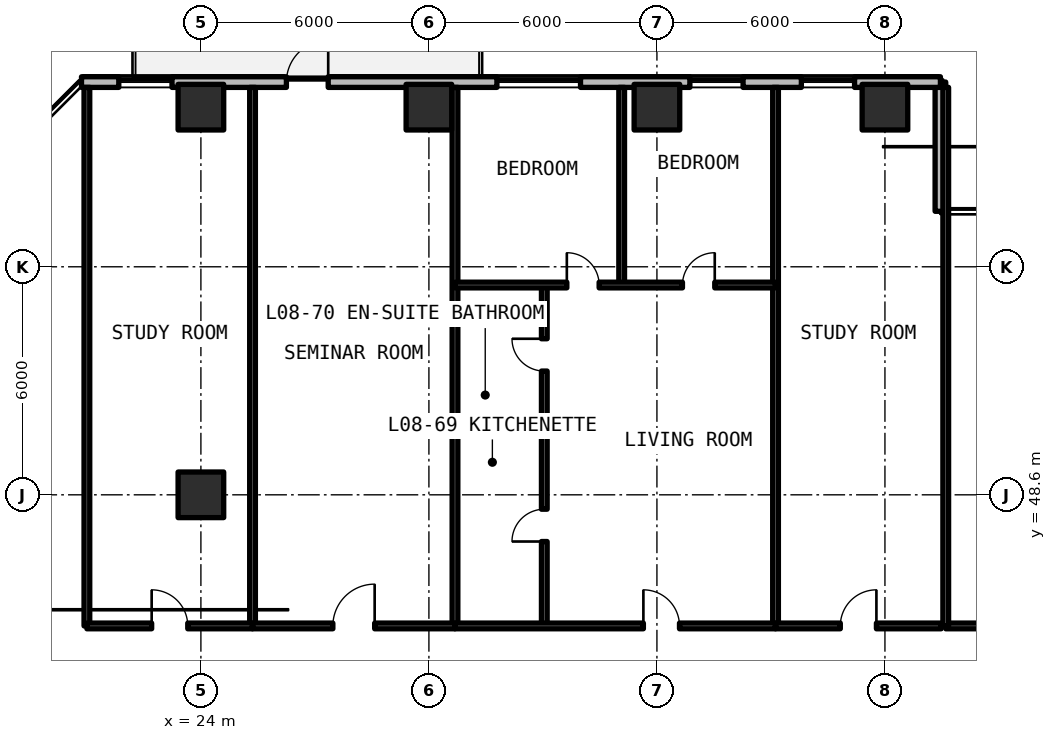
"""IFC4 building model, lengths in metres.
Left out: names, types, materials, properties, quantities, classifications, styles, units other than length and angle.
Written with IfcOpenShell. Run it as: python <this file> out.ifc"""

import sys

from ifc_helpers import new_model, si_unit, direction, frame, frame_2d, origin, origin_2d, place, context, subcontext, project, spatial, rectangle, extrude, element, fill, save


model = new_model("IFC4")
c1 = context("Model", 3, precision=1e-05, world=origin(), true_north=direction((0.0, 1.0)))
c2 = subcontext(c1, "Body", "Model", "MODEL_VIEW")
j1 = project(units=[si_unit("LENGTHUNIT", "METRE"), si_unit("PLANEANGLEUNIT", "RADIAN")], contexts=[c1])
p1 = place(None, origin())
s1 = spatial("IfcSite", under=j1, at=p1, CompositionType="ELEMENT")
p2 = place(p1, origin())
s2 = spatial("IfcBuilding", under=s1, at=p2, CompositionType="ELEMENT")
p3 = place(p2, frame((0.0, 0.0, 32.34)))
s3 = spatial("IfcBuildingStorey", under=s2, at=p3, CompositionType="ELEMENT", Elevation=32.34)
for number, where, z_axis, x_axis in (
    (1, (24.0, 48.6, 0.0), (0.0, 0.0, 1.0), (1.0, 0.0, 0.0)),
    (2, (24.0, 58.8, 0.0), (0.0, 0.0, 1.0), (1.0, 0.0, 0.0)),
    (3, (30.0, 58.8, 0.0), (0.0, 0.0, 1.0), (1.0, 0.0, 0.0)),
    (4, (36.0, 58.8, 0.0), (0.0, 0.0, 1.0), (1.0, 0.0, 0.0)),
    (5, (42.0, 58.8, 0.0), (0.0, 0.0, 1.0), (1.0, 0.0, 0.0)),
):
    element("IfcColumn", number, at=place(p3, frame(where, z_axis=z_axis, x_axis=x_axis)), inside=s3, PredefinedType="COLUMN", context=c2, shape_type="SweptSolid", body=[
        extrude(rectangle(XDim=1.2, YDim=1.2, at=origin_2d()), origin(), (0.0, 0.0, 1.0), 3.3),
    ])
p4 = place(p3, frame((43.46, 56.06, 0.0), z_axis=(0.0, 0.0, 1.0), x_axis=(0.0, 1.0, 0.0)))
e6 = element("IfcWall", 6, at=p4, inside=s3, PredefinedType="SOLIDWALL", context=c2, shape_type="SweptSolid", body=[
    extrude(rectangle(XDim=3.4, YDim=0.28, at=frame_2d((1.7, 0.0))), origin(), (0.0, 0.0, 1.0), 3.08),
])
p5 = place(p3, frame((43.46, 59.46, 0.0), z_axis=(0.0, 0.0, 1.0), x_axis=(-1.0, 0.0, 0.0)))
e7 = element("IfcWall", 7, at=p5, inside=s3, PredefinedType="SOLIDWALL", context=c2, shape_type="SweptSolid", body=[
    extrude(rectangle(XDim=22.602, YDim=0.28, at=frame_2d((11.301, 0.0))), origin(), (0.0, 0.0, 1.0), 3.08),
])
p6 = place(p5, frame((16.11, 0.0, 0.0)))
e8 = element("IfcOpeningElement", 8, at=p6, cuts=e7, PredefinedType="OPENING", context=c2, shape_type="SweptSolid", body=[
    extrude(rectangle(XDim=1.1, YDim=2.15, at=frame_2d((0.55, 1.075))), frame((0.0, 0.15, 0.0), z_axis=(0.0, -1.0, 0.0), x_axis=(1.0, 0.0, 0.0)), (0.0, 0.0, 1.0), 0.3),
])
p7 = place(p5, frame((20.221, 0.0, 0.78)))
e9 = element("IfcOpeningElement", 9, at=p7, cuts=e7, PredefinedType="OPENING", context=c2, shape_type="SweptSolid", body=[
    extrude(rectangle(XDim=1.4, YDim=1.65, at=frame_2d((0.7, 0.825))), frame((0.0, 0.15, 0.0), z_axis=(0.0, -1.0, 0.0), x_axis=(1.0, 0.0, 0.0)), (0.0, 0.0, 1.0), 0.3),
])
p8 = place(p5, frame((9.471, 0.0, 0.78)))
e10 = element("IfcOpeningElement", 10, at=p8, cuts=e7, PredefinedType="OPENING", context=c2, shape_type="SweptSolid", body=[
    extrude(rectangle(XDim=2.2, YDim=1.66, at=frame_2d((1.1, 0.83))), frame((0.0, 0.15, 0.0), z_axis=(0.0, -1.0, 0.0), x_axis=(1.0, 0.0, 0.0)), (0.0, 0.0, 1.0), 0.3),
])
p9 = place(p5, frame((5.193, 0.0, 0.78)))
e11 = element("IfcOpeningElement", 11, at=p9, cuts=e7, PredefinedType="OPENING", context=c2, shape_type="SweptSolid", body=[
    extrude(rectangle(XDim=1.4, YDim=1.65, at=frame_2d((0.7, 0.825))), frame((0.0, 0.15, 0.0), z_axis=(0.0, -1.0, 0.0), x_axis=(1.0, 0.0, 0.0)), (0.0, 0.0, 1.0), 0.3),
])
p10 = place(p5, frame((2.26, 0.0, 0.78)))
e12 = element("IfcOpeningElement", 12, at=p10, cuts=e7, PredefinedType="OPENING", context=c2, shape_type="SweptSolid", body=[
    extrude(rectangle(XDim=1.4, YDim=1.65, at=frame_2d((0.7, 0.825))), frame((0.0, 0.15, 0.0), z_axis=(0.0, -1.0, 0.0), x_axis=(1.0, 0.0, 0.0)), (0.0, 0.0, 1.0), 0.3),
])
p11 = place(p3, frame((43.6, 45.15, 0.0), z_axis=(0.0, 0.0, 1.0), x_axis=(1.0, 0.0, 0.0)))
e13 = element("IfcWall", 13, at=p11, inside=s3, PredefinedType="SOLIDWALL", context=c2, shape_type="SweptSolid", body=[
    extrude(rectangle(XDim=8.4, YDim=0.15, at=frame_2d((4.2, 0.0))), origin(), (0.0, 0.0, 1.0), 2.35),
])
p12 = place(p11, frame((3.65, 0.0, 0.0)))
e14 = element("IfcOpeningElement", 14, at=p12, cuts=e13, PredefinedType="OPENING", context=c2, shape_type="SweptSolid", body=[
    extrude(rectangle(XDim=1.1, YDim=2.15, at=frame_2d((0.55, 1.075))), frame((0.0, 0.085, 0.0), z_axis=(0.0, -1.0, 0.0), x_axis=(1.0, 0.0, 0.0)), (0.0, 0.0, 1.0), 0.17),
])
for number, where, z_axis, x_axis in (
    (15, (43.6, 45.15, 0.0), (0.0, 0.0, 1.0), (0.0, 1.0, 0.0)),
    (16, (21.0, 45.15, 0.0), (0.0, 0.0, 1.0), (0.0, 1.0, 0.0)),
    (17, (25.359, 45.15, 0.0), (0.0, 0.0, 1.0), (0.0, 1.0, 0.0)),
):
    element("IfcWall", number, at=place(p3, frame(where, z_axis=z_axis, x_axis=x_axis)), inside=s3, PredefinedType="SOLIDWALL", context=c2, shape_type="SweptSolid", body=[
        extrude(rectangle(XDim=14.17, YDim=0.15, at=frame_2d((7.085, 0.0))), origin(), (0.0, 0.0, 1.0), 2.35),
    ])
p13 = place(p3, frame((21.0, 45.15, 0.0), z_axis=(0.0, 0.0, 1.0), x_axis=(1.0, 0.0, 0.0)))
e18 = element("IfcWall", 18, at=p13, inside=s3, PredefinedType="SOLIDWALL", context=c2, shape_type="SweptSolid", body=[
    extrude(rectangle(XDim=4.359, YDim=0.15, at=frame_2d((2.179, 0.0))), origin(), (0.0, 0.0, 1.0), 2.35),
])
p14 = place(p13, frame((1.704, 0.0, 0.0)))
e19 = element("IfcOpeningElement", 19, at=p14, cuts=e18, PredefinedType="OPENING", context=c2, shape_type="SweptSolid", body=[
    extrude(rectangle(XDim=0.95, YDim=2.15, at=frame_2d((0.475, 1.075))), frame((0.0, 0.085, 0.0), z_axis=(0.0, -1.0, 0.0), x_axis=(1.0, 0.0, 0.0)), (0.0, 0.0, 1.0), 0.17),
])
p15 = place(p3, frame((30.686, 45.15, 0.0), z_axis=(0.0, 0.0, 1.0), x_axis=(0.0, 1.0, 0.0)))
e20 = element("IfcWall", 20, at=p15, inside=s3, PredefinedType="SOLIDWALL", context=c2, shape_type="SweptSolid", body=[
    extrude(rectangle(XDim=14.17, YDim=0.15, at=frame_2d((7.085, 0.0))), origin(), (0.0, 0.0, 1.0), 2.35),
])
p16 = place(p3, frame((25.359, 45.15, 0.0), z_axis=(0.0, 0.0, 1.0), x_axis=(1.0, 0.0, 0.0)))
e21 = element("IfcWall", 21, at=p16, inside=s3, PredefinedType="SOLIDWALL", context=c2, shape_type="SweptSolid", body=[
    extrude(rectangle(XDim=5.327, YDim=0.15, at=frame_2d((2.664, 0.0))), origin(), (0.0, 0.0, 1.0), 2.35),
])
p17 = place(p16, frame((2.114, 0.0, 0.0)))
e22 = element("IfcOpeningElement", 22, at=p17, cuts=e21, PredefinedType="OPENING", context=c2, shape_type="SweptSolid", body=[
    extrude(rectangle(XDim=1.1, YDim=2.15, at=frame_2d((0.55, 1.075))), frame((0.0, 0.085, 0.0), z_axis=(0.0, -1.0, 0.0), x_axis=(1.0, 0.0, 0.0)), (0.0, 0.0, 1.0), 0.17),
])
p18 = place(p3, frame((39.121, 45.15, 0.0), z_axis=(0.0, 0.0, 1.0), x_axis=(0.0, 1.0, 0.0)))
e23 = element("IfcWall", 23, at=p18, inside=s3, PredefinedType="SOLIDWALL", context=c2, shape_type="SweptSolid", body=[
    extrude(rectangle(XDim=14.17, YDim=0.15, at=frame_2d((7.085, 0.0))), origin(), (0.0, 0.0, 1.0), 2.35),
])
p19 = place(p3, frame((30.686, 50.442, 0.0), z_axis=(0.0, 0.0, 1.0), x_axis=(1.0, 0.0, 0.0)))
e24 = element("IfcWall", 24, at=p19, inside=s3, PredefinedType="PARTITIONING", context=c2, shape_type="SweptSolid", body=[
    extrude(rectangle(XDim=2.35, YDim=0.15, at=frame_2d((1.175, 0.0))), origin(), (0.0, 0.0, 1.0), 2.35),
])
p20 = place(p3, frame((33.036, 45.15, 0.0), z_axis=(0.0, 0.0, 1.0), x_axis=(0.0, 1.0, 0.0)))
e25 = element("IfcWall", 25, at=p20, inside=s3, PredefinedType="PARTITIONING", context=c2, shape_type="SweptSolid", body=[
    extrude(rectangle(XDim=8.97, YDim=0.15, at=frame_2d((4.485, 0.0))), origin(), (0.0, 0.0, 1.0), 2.35),
])
p21 = place(p20, frame((2.221, 0.0, 0.0)))
e26 = element("IfcOpeningElement", 26, at=p21, cuts=e25, PredefinedType="OPENING", context=c2, shape_type="SweptSolid", body=[
    extrude(rectangle(XDim=0.85, YDim=2.1, at=frame_2d((0.425, 1.05))), frame((0.0, 0.085, 0.0), z_axis=(0.0, -1.0, 0.0), x_axis=(1.0, 0.0, 0.0)), (0.0, 0.0, 1.0), 0.17),
])
p22 = place(p20, frame((6.706, 0.0, 0.0)))
e27 = element("IfcOpeningElement", 27, at=p22, cuts=e25, PredefinedType="OPENING", context=c2, shape_type="SweptSolid", body=[
    extrude(rectangle(XDim=0.85, YDim=2.1, at=frame_2d((0.425, 1.05))), frame((0.0, 0.085, 0.0), z_axis=(0.0, -1.0, 0.0), x_axis=(1.0, 0.0, 0.0)), (0.0, 0.0, 1.0), 0.17),
])
p23 = place(p3, frame((35.073, 54.12, 0.0), z_axis=(0.0, 0.0, 1.0), x_axis=(0.0, 1.0, 0.0)))
e28 = element("IfcWall", 28, at=p23, inside=s3, PredefinedType="PARTITIONING", context=c2, shape_type="SweptSolid", body=[
    extrude(rectangle(XDim=5.2, YDim=0.15, at=frame_2d((2.6, 0.0))), origin(), (0.0, 0.0, 1.0), 2.35),
])
p24 = place(p3, frame((30.686, 54.12, 0.0), z_axis=(0.0, 0.0, 1.0), x_axis=(1.0, 0.0, 0.0)))
e29 = element("IfcWall", 29, at=p24, inside=s3, PredefinedType="PARTITIONING", context=c2, shape_type="SweptSolid", body=[
    extrude(rectangle(XDim=8.435, YDim=0.15, at=frame_2d((4.217, 0.0))), origin(), (0.0, 0.0, 1.0), 2.35),
])
p25 = place(p24, frame((2.943, 0.0, 0.0)))
e30 = element("IfcOpeningElement", 30, at=p25, cuts=e29, PredefinedType="OPENING", context=c2, shape_type="SweptSolid", body=[
    extrude(rectangle(XDim=0.85, YDim=2.1, at=frame_2d((0.425, 1.05))), frame((0.0, 0.085, 0.0), z_axis=(0.0, -1.0, 0.0), x_axis=(1.0, 0.0, 0.0)), (0.0, 0.0, 1.0), 0.17),
])
p26 = place(p24, frame((5.986, 0.0, 0.0)))
e31 = element("IfcOpeningElement", 31, at=p26, cuts=e29, PredefinedType="OPENING", context=c2, shape_type="SweptSolid", body=[
    extrude(rectangle(XDim=0.85, YDim=2.1, at=frame_2d((0.425, 1.05))), frame((0.0, 0.085, 0.0), z_axis=(0.0, -1.0, 0.0), x_axis=(1.0, 0.0, 0.0)), (0.0, 0.0, 1.0), 0.17),
])
p27 = place(p3, frame((30.686, 45.15, 0.0), z_axis=(0.0, 0.0, 1.0), x_axis=(1.0, 0.0, 0.0)))
e32 = element("IfcWall", 32, at=p27, inside=s3, PredefinedType="SOLIDWALL", context=c2, shape_type="SweptSolid", body=[
    extrude(rectangle(XDim=8.435, YDim=0.15, at=frame_2d((4.217, 0.0))), origin(), (0.0, 0.0, 1.0), 2.35),
])
p28 = place(p27, frame((4.958, 0.0, 0.0)))
e33 = element("IfcOpeningElement", 33, at=p28, cuts=e32, PredefinedType="OPENING", context=c2, shape_type="SweptSolid", body=[
    extrude(rectangle(XDim=0.95, YDim=2.15, at=frame_2d((0.475, 1.075))), frame((0.0, 0.085, 0.0), z_axis=(0.0, -1.0, 0.0), x_axis=(1.0, 0.0, 0.0)), (0.0, 0.0, 1.0), 0.17),
])
p29 = place(p3, frame((39.121, 45.15, 0.0), z_axis=(0.0, 0.0, 1.0), x_axis=(1.0, 0.0, 0.0)))
e34 = element("IfcWall", 34, at=p29, inside=s3, PredefinedType="SOLIDWALL", context=c2, shape_type="SweptSolid", body=[
    extrude(rectangle(XDim=4.359, YDim=0.15, at=frame_2d((2.179, 0.0))), origin(), (0.0, 0.0, 1.0), 2.35),
])
p30 = place(p29, frame((1.704, 0.0, 0.0)))
e35 = element("IfcOpeningElement", 35, at=p30, cuts=e34, PredefinedType="OPENING", context=c2, shape_type="SweptSolid", body=[
    extrude(rectangle(XDim=0.95, YDim=2.15, at=frame_2d((0.475, 1.075))), frame((0.0, 0.085, 0.0), z_axis=(0.0, -1.0, 0.0), x_axis=(1.0, 0.0, 0.0)), (0.0, 0.0, 1.0), 0.17),
])
p31 = place(p6, frame((1.1, 0.0, 0.0), z_axis=(0.0, 0.0, 1.0), x_axis=(-1.0, 0.0, 0.0)))
e36 = element("IfcDoor", 36, at=p31, inside=s3, OperationType="SINGLE_SWING_RIGHT", PredefinedType="DOOR", context=c2, shape_type="SweptSolid", body=[
    extrude(rectangle(XDim=1.1, YDim=2.15, at=frame_2d((0.55, 1.075))), frame((0.0, 0.025, 0.0), z_axis=(0.0, -1.0, 0.0), x_axis=(1.0, 0.0, 0.0)), (0.0, 0.0, 1.0), 0.05),
])
fill(e8, e36)
p32 = place(p7, origin())
e37 = element("IfcWindow", 37, at=p32, inside=s3, PartitioningType="SINGLE_PANEL", PredefinedType="WINDOW", context=c2, shape_type="SweptSolid", body=[
    extrude(rectangle(XDim=1.4, YDim=1.65, at=frame_2d((0.7, 0.825))), frame((0.0, 0.03, 0.0), z_axis=(0.0, -1.0, 0.0), x_axis=(1.0, 0.0, 0.0)), (0.0, 0.0, 1.0), 0.06),
])
fill(e9, e37)
p33 = place(p8, origin())
e38 = element("IfcWindow", 38, at=p33, inside=s3, PartitioningType="SINGLE_PANEL", PredefinedType="WINDOW", context=c2, shape_type="SweptSolid", body=[
    extrude(rectangle(XDim=2.2, YDim=1.66, at=frame_2d((1.1, 0.83))), frame((0.0, 0.03, 0.0), z_axis=(0.0, -1.0, 0.0), x_axis=(1.0, 0.0, 0.0)), (0.0, 0.0, 1.0), 0.06),
])
fill(e10, e38)
p34 = place(p9, origin())
e39 = element("IfcWindow", 39, at=p34, inside=s3, PartitioningType="SINGLE_PANEL", PredefinedType="WINDOW", context=c2, shape_type="SweptSolid", body=[
    extrude(rectangle(XDim=1.4, YDim=1.65, at=frame_2d((0.7, 0.825))), frame((0.0, 0.03, 0.0), z_axis=(0.0, -1.0, 0.0), x_axis=(1.0, 0.0, 0.0)), (0.0, 0.0, 1.0), 0.06),
])
fill(e11, e39)
p35 = place(p10, origin())
e40 = element("IfcWindow", 40, at=p35, inside=s3, PartitioningType="SINGLE_PANEL", PredefinedType="WINDOW", context=c2, shape_type="SweptSolid", body=[
    extrude(rectangle(XDim=1.4, YDim=1.65, at=frame_2d((0.7, 0.825))), frame((0.0, 0.03, 0.0), z_axis=(0.0, -1.0, 0.0), x_axis=(1.0, 0.0, 0.0)), (0.0, 0.0, 1.0), 0.06),
])
fill(e12, e40)
p36 = place(p14, origin())
e41 = element("IfcDoor", 41, at=p36, inside=s3, OperationType="SINGLE_SWING_LEFT", PredefinedType="DOOR", context=c2, shape_type="SweptSolid", body=[
    extrude(rectangle(XDim=0.95, YDim=2.15, at=frame_2d((0.475, 1.075))), frame((0.0, 0.025, 0.0), z_axis=(0.0, -1.0, 0.0), x_axis=(1.0, 0.0, 0.0)), (0.0, 0.0, 1.0), 0.05),
])
fill(e19, e41)
p37 = place(p17, origin())
e42 = element("IfcDoor", 42, at=p37, inside=s3, OperationType="SINGLE_SWING_RIGHT", PredefinedType="DOOR", context=c2, shape_type="SweptSolid", body=[
    extrude(rectangle(XDim=1.1, YDim=2.15, at=frame_2d((0.55, 1.075))), frame((0.0, 0.025, 0.0), z_axis=(0.0, -1.0, 0.0), x_axis=(1.0, 0.0, 0.0)), (0.0, 0.0, 1.0), 0.05),
])
fill(e22, e42)
p38 = place(p21, origin())
e43 = element("IfcDoor", 43, at=p38, inside=s3, OperationType="SINGLE_SWING_LEFT", PredefinedType="DOOR", context=c2, shape_type="SweptSolid", body=[
    extrude(rectangle(XDim=0.85, YDim=2.1, at=frame_2d((0.425, 1.05))), frame((0.0, 0.025, 0.0), z_axis=(0.0, -1.0, 0.0), x_axis=(1.0, 0.0, 0.0)), (0.0, 0.0, 1.0), 0.05),
])
fill(e26, e43)
p39 = place(p22, origin())
e44 = element("IfcDoor", 44, at=p39, inside=s3, OperationType="SINGLE_SWING_RIGHT", PredefinedType="DOOR", context=c2, shape_type="SweptSolid", body=[
    extrude(rectangle(XDim=0.85, YDim=2.1, at=frame_2d((0.425, 1.05))), frame((0.0, 0.025, 0.0), z_axis=(0.0, -1.0, 0.0), x_axis=(1.0, 0.0, 0.0)), (0.0, 0.0, 1.0), 0.05),
])
fill(e27, e44)
p40 = place(p25, origin())
e45 = element("IfcDoor", 45, at=p40, inside=s3, OperationType="SINGLE_SWING_LEFT", PredefinedType="DOOR", context=c2, shape_type="SweptSolid", body=[
    extrude(rectangle(XDim=0.85, YDim=2.1, at=frame_2d((0.425, 1.05))), frame((0.0, 0.025, 0.0), z_axis=(0.0, -1.0, 0.0), x_axis=(1.0, 0.0, 0.0)), (0.0, 0.0, 1.0), 0.05),
])
fill(e30, e45)
p41 = place(p26, origin())
e46 = element("IfcDoor", 46, at=p41, inside=s3, OperationType="SINGLE_SWING_RIGHT", PredefinedType="DOOR", context=c2, shape_type="SweptSolid", body=[
    extrude(rectangle(XDim=0.85, YDim=2.1, at=frame_2d((0.425, 1.05))), frame((0.0, 0.025, 0.0), z_axis=(0.0, -1.0, 0.0), x_axis=(1.0, 0.0, 0.0)), (0.0, 0.0, 1.0), 0.05),
])
fill(e31, e46)
p42 = place(p28, origin())
e47 = element("IfcDoor", 47, at=p42, inside=s3, OperationType="SINGLE_SWING_LEFT", PredefinedType="DOOR", context=c2, shape_type="SweptSolid", body=[
    extrude(rectangle(XDim=0.95, YDim=2.15, at=frame_2d((0.475, 1.075))), frame((0.0, 0.025, 0.0), z_axis=(0.0, -1.0, 0.0), x_axis=(1.0, 0.0, 0.0)), (0.0, 0.0, 1.0), 0.05),
])
fill(e33, e47)
p43 = place(p30, origin())
e48 = element("IfcDoor", 48, at=p43, inside=s3, OperationType="SINGLE_SWING_RIGHT", PredefinedType="DOOR", context=c2, shape_type="SweptSolid", body=[
    extrude(rectangle(XDim=0.95, YDim=2.15, at=frame_2d((0.475, 1.075))), frame((0.0, 0.025, 0.0), z_axis=(0.0, -1.0, 0.0), x_axis=(1.0, 0.0, 0.0)), (0.0, 0.0, 1.0), 0.05),
])
fill(e35, e48)
save(model, sys.argv[1])
